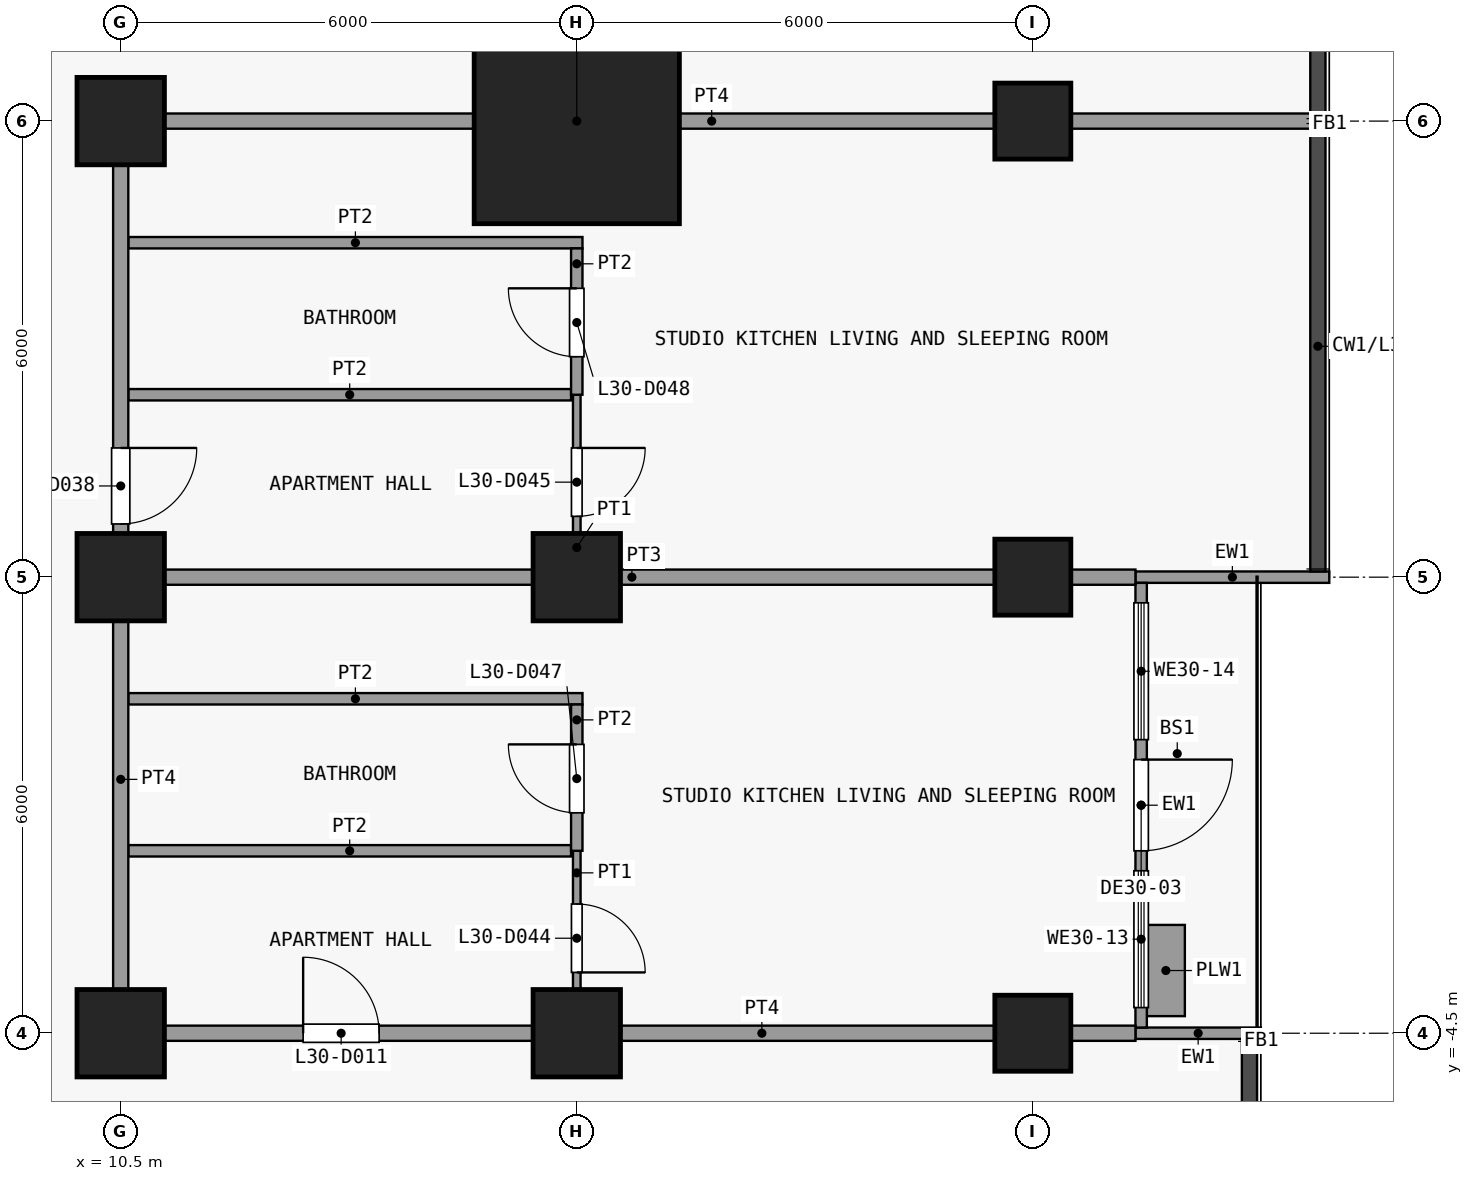
"""IFC4 building model, lengths in metres.
Left out: names, types, materials, properties, quantities, classifications, styles, units other than length and angle.
Written with IfcOpenShell. Run it as: python <this file> out.ifc"""

import sys

from ifc_helpers import new_model, si_unit, direction, frame, frame_2d, origin, origin_2d, place, context, subcontext, project, spatial, rectangle, extrude, element, fill, save


model = new_model("IFC4")
c1 = context("Model", 3, precision=1e-05, world=origin(), true_north=direction((0.0, 1.0)))
c2 = subcontext(c1, "Body", "Model", "MODEL_VIEW")
j1 = project(units=[si_unit("LENGTHUNIT", "METRE"), si_unit("PLANEANGLEUNIT", "RADIAN")], contexts=[c1])
p1 = place(None, origin())
s1 = spatial("IfcSite", under=j1, at=p1, CompositionType="ELEMENT")
p2 = place(p1, origin())
s2 = spatial("IfcBuilding", under=s1, at=p2, CompositionType="ELEMENT")
p3 = place(p2, frame((0.0, 0.0, 120.7)))
s3 = spatial("IfcBuildingStorey", under=s2, at=p3, CompositionType="ELEMENT", Elevation=120.7)
for number, where, z_axis, x_axis in (
    (1, (10.5, -4.5, 0.0), (0.0, 0.0, 1.0), (1.0, 0.0, 0.0)),
    (2, (10.5, 1.5, 0.0), (0.0, 0.0, 1.0), (1.0, 0.0, 0.0)),
    (3, (10.5, 7.5, 0.0), (0.0, 0.0, 1.0), (1.0, 0.0, 0.0)),
    (4, (16.5, -4.5, 0.0), (0.0, 0.0, 1.0), (1.0, 0.0, 0.0)),
    (5, (16.5, 1.5, 0.0), (0.0, 0.0, 1.0), (1.0, 0.0, 0.0)),
):
    element("IfcColumn", number, at=place(p3, frame(where, z_axis=z_axis, x_axis=x_axis)), inside=s3, PredefinedType="COLUMN", context=c2, shape_type="SweptSolid", body=[
        extrude(rectangle(XDim=1.15, YDim=1.15, at=origin_2d()), origin(), (0.0, 0.0, 1.0), 3.6),
    ])
p4 = place(p3, frame((16.5, 7.5, 0.0), z_axis=(0.0, 0.0, 1.0), x_axis=(1.0, 0.0, 0.0)))
e6 = element("IfcColumn", 6, at=p4, inside=s3, PredefinedType="COLUMN", context=c2, shape_type="SweptSolid", body=[
    extrude(rectangle(XDim=2.7, YDim=2.7, at=origin_2d()), origin(), (0.0, 0.0, 1.0), 3.6),
])
for number, where, z_axis, x_axis in (
    (7, (22.5, -4.5, 0.0), (0.0, 0.0, 1.0), (1.0, 0.0, 0.0)),
    (8, (22.5, 1.5, 0.0), (0.0, 0.0, 1.0), (1.0, 0.0, 0.0)),
    (9, (22.5, 7.5, 0.0), (0.0, 0.0, 1.0), (1.0, 0.0, 0.0)),
):
    element("IfcColumn", number, at=place(p3, frame(where, z_axis=z_axis, x_axis=x_axis)), inside=s3, PredefinedType="COLUMN", context=c2, shape_type="SweptSolid", body=[
        extrude(rectangle(XDim=1.0, YDim=1.0, at=origin_2d()), origin(), (0.0, 0.0, 1.0), 3.6),
    ])
p5 = place(p3, frame((23.85, -4.5, 0.0), z_axis=(0.0, 0.0, 1.0), x_axis=(1.0, 0.0, 0.0)))
e10 = element("IfcWall", 10, at=p5, inside=s3, PredefinedType="SOLIDWALL", context=c2, shape_type="SweptSolid", body=[
    extrude(rectangle(XDim=1.65, YDim=0.15, at=frame_2d((0.825, 0.0))), origin(), (0.0, 0.0, 1.0), 3.3),
])
p6 = place(p3, frame((23.85, 1.5, 0.0), z_axis=(0.0, 0.0, 1.0), x_axis=(1.0, 0.0, 0.0)))
e11 = element("IfcWall", 11, at=p6, inside=s3, PredefinedType="SOLIDWALL", context=c2, shape_type="SweptSolid", body=[
    extrude(rectangle(XDim=2.55, YDim=0.15, at=frame_2d((1.275, 0.0))), origin(), (0.0, 0.0, 1.0), 3.3),
])
p7 = place(p3, frame((23.925, 1.425, 0.0), z_axis=(0.0, 0.0, 1.0), x_axis=(0.0, -1.0, 0.0)))
e12 = element("IfcWall", 12, at=p7, inside=s3, PredefinedType="SOLIDWALL", context=c2, shape_type="SweptSolid", body=[
    extrude(rectangle(XDim=5.85, YDim=0.15, at=frame_2d((2.925, 0.0))), origin(), (0.0, 0.0, 1.0), 3.3),
])
p8 = place(p7, frame((2.325, 0.0, 0.0)))
e13 = element("IfcOpeningElement", 13, at=p8, cuts=e12, PredefinedType="OPENING", context=c2, shape_type="SweptSolid", body=[
    extrude(rectangle(XDim=1.2, YDim=2.4, at=frame_2d((0.6, 1.2))), frame((0.0, 0.085, 0.0), z_axis=(0.0, -1.0, 0.0), x_axis=(1.0, 0.0, 0.0)), (0.0, 0.0, 1.0), 0.17),
])
p9 = place(p7, frame((3.788, 0.0, 0.9)))
e14 = element("IfcOpeningElement", 14, at=p9, cuts=e12, PredefinedType="OPENING", context=c2, shape_type="SweptSolid", body=[
    extrude(rectangle(XDim=1.8, YDim=2.1, at=frame_2d((0.9, 1.05))), frame((0.0, 0.085, 0.0), z_axis=(0.0, -1.0, 0.0), x_axis=(1.0, 0.0, 0.0)), (0.0, 0.0, 1.0), 0.17),
])
p10 = place(p7, frame((0.262, 0.0, 0.9)))
e15 = element("IfcOpeningElement", 15, at=p10, cuts=e12, PredefinedType="OPENING", context=c2, shape_type="SweptSolid", body=[
    extrude(rectangle(XDim=1.8, YDim=2.1, at=frame_2d((0.9, 1.05))), frame((0.0, 0.085, 0.0), z_axis=(0.0, -1.0, 0.0), x_axis=(1.0, 0.0, 0.0)), (0.0, 0.0, 1.0), 0.17),
])
p11 = place(p3, frame((24.25, -4.275, 0.0), z_axis=(0.0, 0.0, 1.0), x_axis=(0.0, 1.0, 0.0)))
e16 = element("IfcWall", 16, at=p11, inside=s3, PredefinedType="USERDEFINED", context=c2, shape_type="SweptSolid", body=[
    extrude(rectangle(XDim=1.2, YDim=0.5, at=frame_2d((0.6, 0.0))), origin(), (0.0, 0.0, 1.0), 0.9),
])
p12 = place(p3, frame((10.4, -4.5, 0.0), z_axis=(0.0, 0.0, 1.0), x_axis=(1.0, 0.0, 0.0)))
e17 = element("IfcWall", 17, at=p12, inside=s3, PredefinedType="PARTITIONING", context=c2, shape_type="SweptSolid", body=[
    extrude(rectangle(XDim=13.45, YDim=0.2, at=frame_2d((6.725, 0.0))), origin(), (0.0, 0.0, 1.0), 3.3),
])
p13 = place(p12, frame((2.5, 0.0, 0.0)))
e18 = element("IfcOpeningElement", 18, at=p13, cuts=e17, PredefinedType="OPENING", context=c2, shape_type="SweptSolid", body=[
    extrude(rectangle(XDim=1.0, YDim=2.1, at=frame_2d((0.5, 1.05))), frame((0.0, 0.11, 0.0), z_axis=(0.0, -1.0, 0.0), x_axis=(1.0, 0.0, 0.0)), (0.0, 0.0, 1.0), 0.22),
])
p14 = place(p3, frame((10.6, -2.1, 0.0), z_axis=(0.0, 0.0, 1.0), x_axis=(1.0, 0.0, 0.0)))
e19 = element("IfcWall", 19, at=p14, inside=s3, PredefinedType="PARTITIONING", context=c2, shape_type="SweptSolid", body=[
    extrude(rectangle(XDim=5.825, YDim=0.15, at=frame_2d((2.913, 0.0))), origin(), (0.0, 0.0, 1.0), 3.3),
])
p15 = place(p3, frame((10.6, -0.1, 0.0), z_axis=(0.0, 0.0, 1.0), x_axis=(1.0, 0.0, 0.0)))
e20 = element("IfcWall", 20, at=p15, inside=s3, PredefinedType="PARTITIONING", context=c2, shape_type="SweptSolid", body=[
    extrude(rectangle(XDim=5.975, YDim=0.15, at=frame_2d((2.987, 0.0))), origin(), (0.0, 0.0, 1.0), 3.3),
])
p16 = place(p3, frame((10.6, 1.5, 0.0), z_axis=(0.0, 0.0, 1.0), x_axis=(1.0, 0.0, 0.0)))
e21 = element("IfcWall", 21, at=p16, inside=s3, PredefinedType="PARTITIONING", context=c2, shape_type="SweptSolid", body=[
    extrude(rectangle(XDim=13.25, YDim=0.2, at=frame_2d((6.625, 0.0))), origin(), (0.0, 0.0, 1.0), 3.3),
])
p17 = place(p3, frame((10.6, 3.9, 0.0), z_axis=(0.0, 0.0, 1.0), x_axis=(1.0, 0.0, 0.0)))
e22 = element("IfcWall", 22, at=p17, inside=s3, PredefinedType="PARTITIONING", context=c2, shape_type="SweptSolid", body=[
    extrude(rectangle(XDim=5.825, YDim=0.15, at=frame_2d((2.913, 0.0))), origin(), (0.0, 0.0, 1.0), 3.3),
])
p18 = place(p3, frame((10.6, 5.9, 0.0), z_axis=(0.0, 0.0, 1.0), x_axis=(1.0, 0.0, 0.0)))
e23 = element("IfcWall", 23, at=p18, inside=s3, PredefinedType="PARTITIONING", context=c2, shape_type="SweptSolid", body=[
    extrude(rectangle(XDim=5.975, YDim=0.15, at=frame_2d((2.987, 0.0))), origin(), (0.0, 0.0, 1.0), 3.3),
])
p19 = place(p3, frame((10.4, 7.5, 0.0), z_axis=(0.0, 0.0, 1.0), x_axis=(1.0, 0.0, 0.0)))
e24 = element("IfcWall", 24, at=p19, inside=s3, PredefinedType="PARTITIONING", context=c2, shape_type="SweptSolid", body=[
    extrude(rectangle(XDim=15.75, YDim=0.2, at=frame_2d((7.875, 0.0))), origin(), (0.0, 0.0, 1.0), 3.3),
])
p20 = place(p3, frame((10.5, -4.4, 0.0), z_axis=(0.0, 0.0, 1.0), x_axis=(0.0, 1.0, 0.0)))
e25 = element("IfcWall", 25, at=p20, inside=s3, PredefinedType="PARTITIONING", context=c2, shape_type="SweptSolid", body=[
    extrude(rectangle(XDim=11.8, YDim=0.2, at=frame_2d((5.9, 0.0))), origin(), (0.0, 0.0, 1.0), 3.3),
])
p21 = place(p20, frame((6.6, 0.0, 0.0)))
e26 = element("IfcOpeningElement", 26, at=p21, cuts=e25, PredefinedType="OPENING", context=c2, shape_type="SweptSolid", body=[
    extrude(rectangle(XDim=1.0, YDim=2.1, at=frame_2d((0.5, 1.05))), frame((0.0, 0.11, 0.0), z_axis=(0.0, -1.0, 0.0), x_axis=(1.0, 0.0, 0.0)), (0.0, 0.0, 1.0), 0.22),
])
p22 = place(p3, frame((16.5, -4.4, 0.0), z_axis=(0.0, 0.0, 1.0), x_axis=(0.0, 1.0, 0.0)))
e27 = element("IfcWall", 27, at=p22, inside=s3, PredefinedType="PARTITIONING", context=c2, shape_type="SweptSolid", body=[
    extrude(rectangle(XDim=2.3, YDim=0.1, at=frame_2d((1.15, 0.0))), origin(), (0.0, 0.0, 1.0), 3.3),
])
p23 = place(p22, frame((0.7, 0.0, 0.0)))
e28 = element("IfcOpeningElement", 28, at=p23, cuts=e27, PredefinedType="OPENING", context=c2, shape_type="SweptSolid", body=[
    extrude(rectangle(XDim=0.9, YDim=2.1, at=frame_2d((0.45, 1.05))), frame((0.0, 0.06, 0.0), z_axis=(0.0, -1.0, 0.0), x_axis=(1.0, 0.0, 0.0)), (0.0, 0.0, 1.0), 0.12),
])
p24 = place(p3, frame((16.5, 1.6, 0.0), z_axis=(0.0, 0.0, 1.0), x_axis=(0.0, 1.0, 0.0)))
e29 = element("IfcWall", 29, at=p24, inside=s3, PredefinedType="PARTITIONING", context=c2, shape_type="SweptSolid", body=[
    extrude(rectangle(XDim=2.3, YDim=0.1, at=frame_2d((1.15, 0.0))), origin(), (0.0, 0.0, 1.0), 3.3),
])
p25 = place(p24, frame((0.7, 0.0, 0.0)))
e30 = element("IfcOpeningElement", 30, at=p25, cuts=e29, PredefinedType="OPENING", context=c2, shape_type="SweptSolid", body=[
    extrude(rectangle(XDim=0.9, YDim=2.1, at=frame_2d((0.45, 1.05))), frame((0.0, 0.06, 0.0), z_axis=(0.0, -1.0, 0.0), x_axis=(1.0, 0.0, 0.0)), (0.0, 0.0, 1.0), 0.12),
])
p26 = place(p3, frame((16.5, -2.1, 0.0), z_axis=(0.0, 0.0, 1.0), x_axis=(0.0, 1.0, 0.0)))
e31 = element("IfcWall", 31, at=p26, inside=s3, PredefinedType="PARTITIONING", context=c2, shape_type="SweptSolid", body=[
    extrude(rectangle(XDim=1.925, YDim=0.15, at=frame_2d((0.962, 0.0))), origin(), (0.0, 0.0, 1.0), 3.3),
])
p27 = place(p26, frame((0.5, 0.0, 0.0)))
e32 = element("IfcOpeningElement", 32, at=p27, cuts=e31, PredefinedType="OPENING", context=c2, shape_type="SweptSolid", body=[
    extrude(rectangle(XDim=0.9, YDim=2.1, at=frame_2d((0.45, 1.05))), frame((0.0, 0.085, 0.0), z_axis=(0.0, -1.0, 0.0), x_axis=(1.0, 0.0, 0.0)), (0.0, 0.0, 1.0), 0.17),
])
p28 = place(p3, frame((16.5, 3.9, 0.0), z_axis=(0.0, 0.0, 1.0), x_axis=(0.0, 1.0, 0.0)))
e33 = element("IfcWall", 33, at=p28, inside=s3, PredefinedType="PARTITIONING", context=c2, shape_type="SweptSolid", body=[
    extrude(rectangle(XDim=1.925, YDim=0.15, at=frame_2d((0.962, 0.0))), origin(), (0.0, 0.0, 1.0), 3.3),
])
p29 = place(p28, frame((0.5, 0.0, 0.0)))
e34 = element("IfcOpeningElement", 34, at=p29, cuts=e33, PredefinedType="OPENING", context=c2, shape_type="SweptSolid", body=[
    extrude(rectangle(XDim=0.9, YDim=2.1, at=frame_2d((0.45, 1.05))), frame((0.0, 0.085, 0.0), z_axis=(0.0, -1.0, 0.0), x_axis=(1.0, 0.0, 0.0)), (0.0, 0.0, 1.0), 0.17),
])
p30 = place(p8, origin())
e35 = element("IfcDoor", 35, at=p30, inside=s3, OperationType="SINGLE_SWING_LEFT", PredefinedType="DOOR", context=c2, shape_type="SweptSolid", body=[
    extrude(rectangle(XDim=1.2, YDim=2.4, at=frame_2d((0.6, 1.2))), frame((0.0, 0.025, 0.0), z_axis=(0.0, -1.0, 0.0), x_axis=(1.0, 0.0, 0.0)), (0.0, 0.0, 1.0), 0.05),
])
fill(e13, e35)
p31 = place(p9, origin())
e36 = element("IfcWindow", 36, at=p31, inside=s3, PartitioningType="SINGLE_PANEL", PredefinedType="WINDOW", context=c2, shape_type="SweptSolid", body=[
    extrude(rectangle(XDim=1.8, YDim=2.1, at=frame_2d((0.9, 1.05))), frame((0.0, 0.03, 0.0), z_axis=(0.0, -1.0, 0.0), x_axis=(1.0, 0.0, 0.0)), (0.0, 0.0, 1.0), 0.06),
])
fill(e14, e36)
p32 = place(p10, origin())
e37 = element("IfcWindow", 37, at=p32, inside=s3, PartitioningType="SINGLE_PANEL", PredefinedType="WINDOW", context=c2, shape_type="SweptSolid", body=[
    extrude(rectangle(XDim=1.8, YDim=2.1, at=frame_2d((0.9, 1.05))), frame((0.0, 0.03, 0.0), z_axis=(0.0, -1.0, 0.0), x_axis=(1.0, 0.0, 0.0)), (0.0, 0.0, 1.0), 0.06),
])
fill(e15, e37)
p33 = place(p13, origin())
e38 = element("IfcDoor", 38, at=p33, inside=s3, OperationType="SINGLE_SWING_RIGHT", PredefinedType="DOOR", context=c2, shape_type="SweptSolid", body=[
    extrude(rectangle(XDim=1.0, YDim=2.1, at=frame_2d((0.5, 1.05))), frame((0.0, 0.025, 0.0), z_axis=(0.0, -1.0, 0.0), x_axis=(1.0, 0.0, 0.0)), (0.0, 0.0, 1.0), 0.05),
])
fill(e18, e38)
p34 = place(p21, origin())
e39 = element("IfcDoor", 39, at=p34, inside=s3, OperationType="SINGLE_SWING_RIGHT", PredefinedType="DOOR", context=c2, shape_type="SweptSolid", body=[
    extrude(rectangle(XDim=1.0, YDim=2.1, at=frame_2d((0.5, 1.05))), frame((0.0, 0.025, 0.0), z_axis=(0.0, -1.0, 0.0), x_axis=(1.0, 0.0, 0.0)), (0.0, 0.0, 1.0), 0.05),
])
fill(e26, e39)
p35 = place(p23, origin())
e40 = element("IfcDoor", 40, at=p35, inside=s3, OperationType="SINGLE_SWING_LEFT", PredefinedType="DOOR", context=c2, shape_type="SweptSolid", body=[
    extrude(rectangle(XDim=0.9, YDim=2.1, at=frame_2d((0.45, 1.05))), frame((0.0, 0.025, 0.0), z_axis=(0.0, -1.0, 0.0), x_axis=(1.0, 0.0, 0.0)), (0.0, 0.0, 1.0), 0.05),
])
fill(e28, e40)
p36 = place(p25, origin())
e41 = element("IfcDoor", 41, at=p36, inside=s3, OperationType="SINGLE_SWING_RIGHT", PredefinedType="DOOR", context=c2, shape_type="SweptSolid", body=[
    extrude(rectangle(XDim=0.9, YDim=2.1, at=frame_2d((0.45, 1.05))), frame((0.0, 0.025, 0.0), z_axis=(0.0, -1.0, 0.0), x_axis=(1.0, 0.0, 0.0)), (0.0, 0.0, 1.0), 0.05),
])
fill(e30, e41)
p37 = place(p27, origin())
e42 = element("IfcDoor", 42, at=p37, inside=s3, OperationType="SINGLE_SWING_LEFT", PredefinedType="DOOR", context=c2, shape_type="SweptSolid", body=[
    extrude(rectangle(XDim=0.9, YDim=2.1, at=frame_2d((0.45, 1.05))), frame((0.0, 0.025, 0.0), z_axis=(0.0, -1.0, 0.0), x_axis=(1.0, 0.0, 0.0)), (0.0, 0.0, 1.0), 0.05),
])
fill(e32, e42)
p38 = place(p29, origin())
e43 = element("IfcDoor", 43, at=p38, inside=s3, OperationType="SINGLE_SWING_LEFT", PredefinedType="DOOR", context=c2, shape_type="SweptSolid", body=[
    extrude(rectangle(XDim=0.9, YDim=2.1, at=frame_2d((0.45, 1.05))), frame((0.0, 0.025, 0.0), z_axis=(0.0, -1.0, 0.0), x_axis=(1.0, 0.0, 0.0)), (0.0, 0.0, 1.0), 0.05),
])
fill(e34, e43)
save(model, sys.argv[1])
